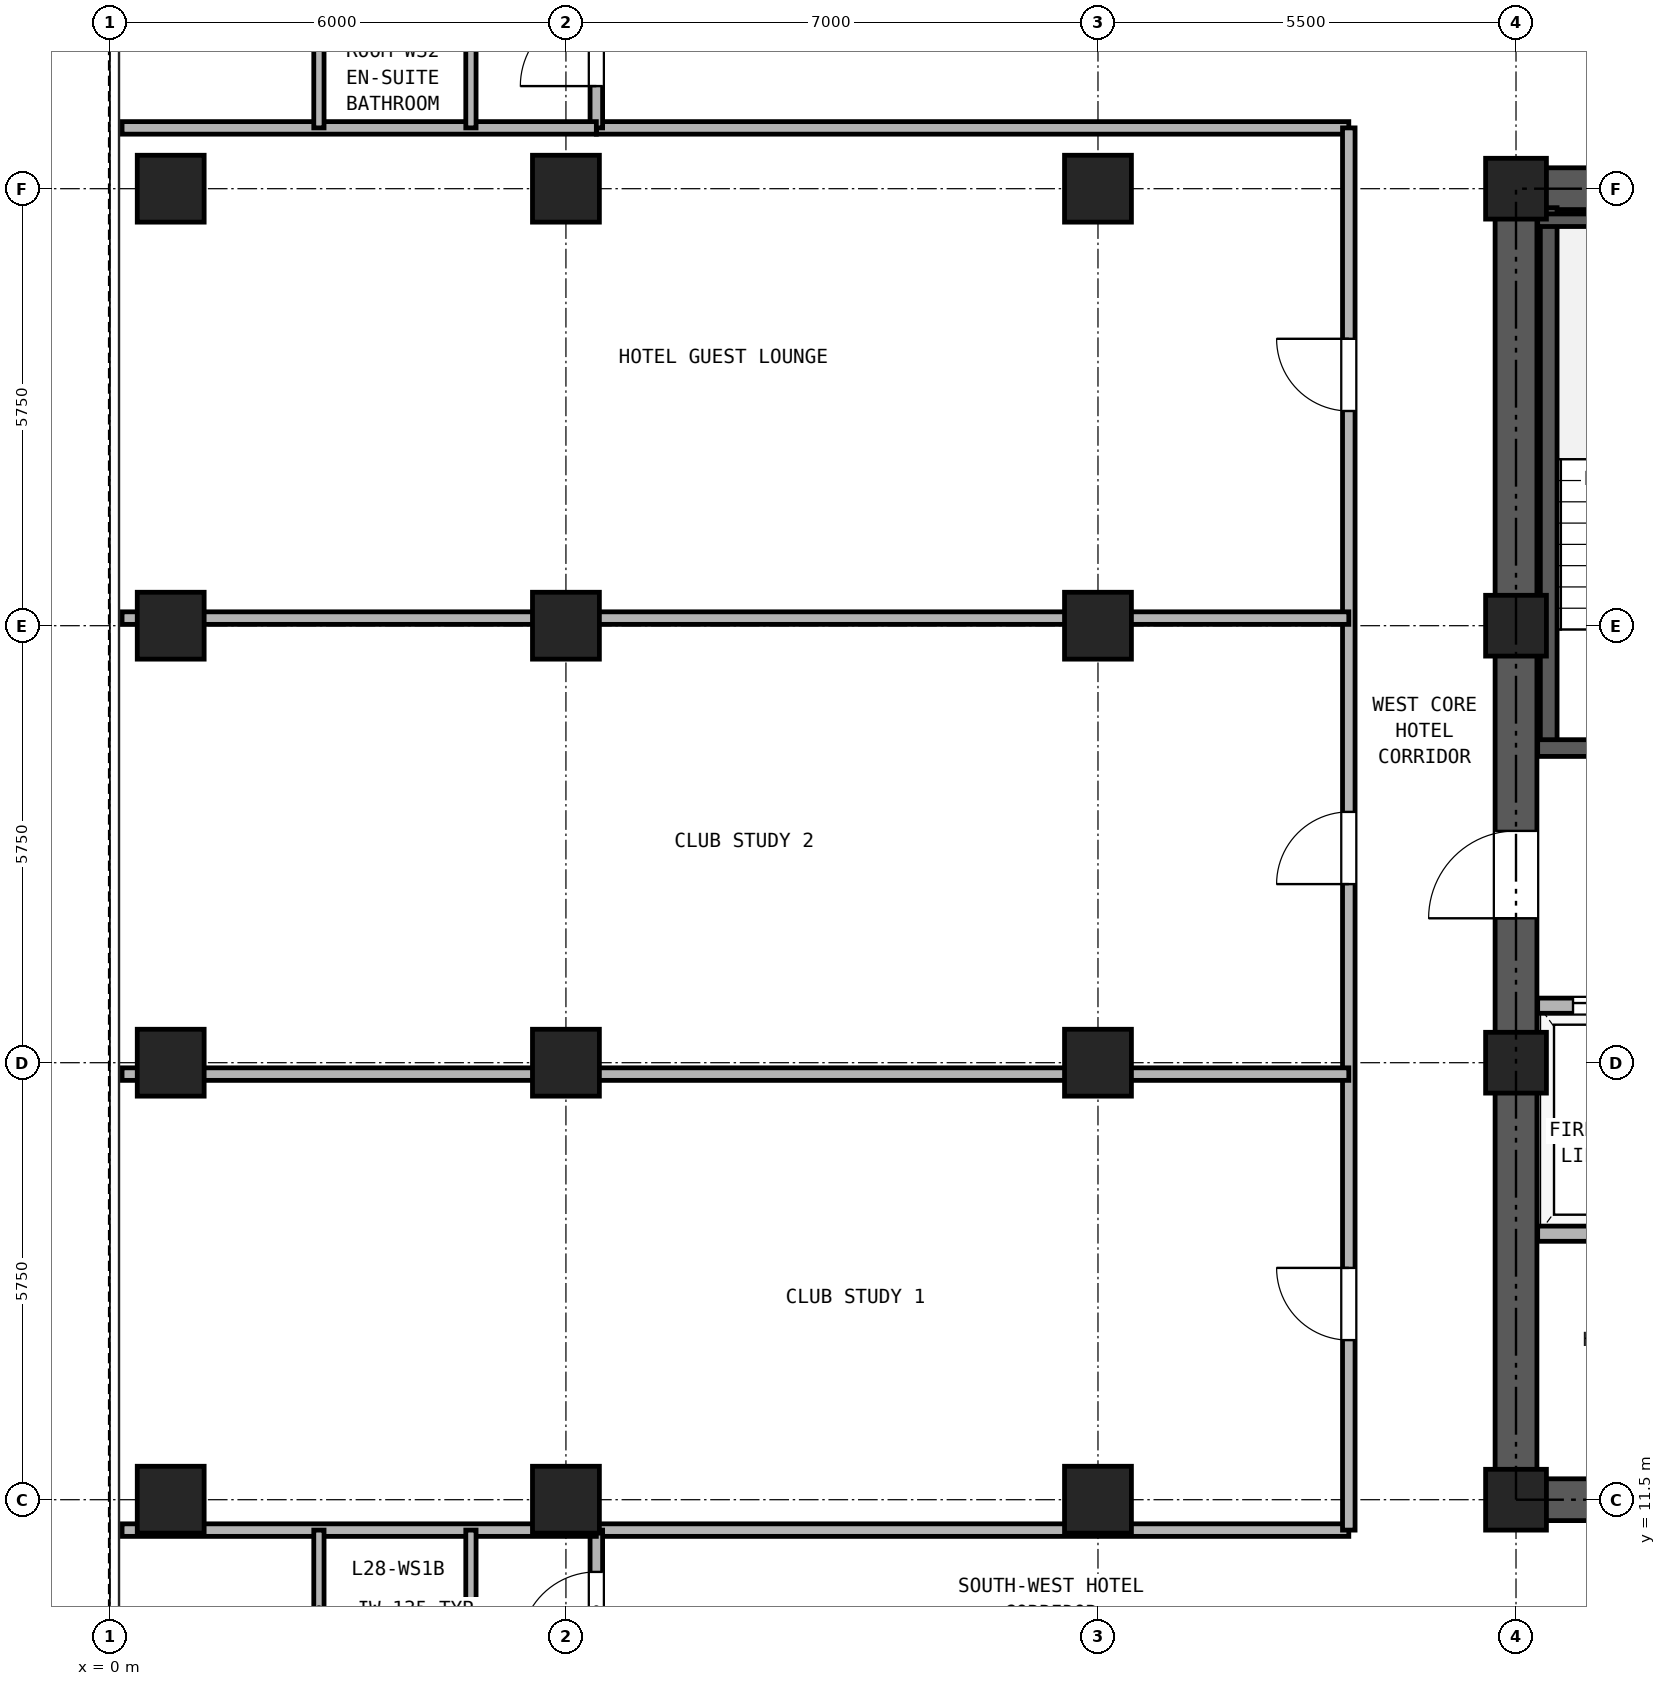
"""IFC4 building model, lengths in metres.
Left out: names, types, materials, properties, quantities, classifications, styles, units other than length and angle.
Written with IfcOpenShell. Run it as: python <this file> out.ifc"""

import sys

from ifc_helpers import new_model, si_unit, direction, frame, frame_2d, origin, origin_2d, place, context, subcontext, project, spatial, rectangle, hollow_rectangle, extrude, source, transform, mapped, element, fill, save


model = new_model("IFC4")
c1 = context("Model", 3, precision=1e-05, world=origin(), true_north=direction((0.0, 1.0)))
c2 = subcontext(c1, "Body", "Model", "MODEL_VIEW")
j1 = project(units=[si_unit("LENGTHUNIT", "METRE"), si_unit("PLANEANGLEUNIT", "RADIAN")], contexts=[c1])
p1 = place(None, origin())
s1 = spatial("IfcSite", under=j1, at=p1, CompositionType="ELEMENT")
p2 = place(p1, origin())
s2 = spatial("IfcBuilding", under=s1, at=p2, CompositionType="ELEMENT")
p3 = place(p2, frame((0.0, 0.0, 105.5)))
s3 = spatial("IfcBuildingStorey", under=s2, at=p3, CompositionType="ELEMENT", Elevation=105.5)
m1 = source(origin(), c2, "Body", "SweptSolid", [
    extrude(hollow_rectangle(XDim=0.88, YDim=0.88, WallThickness=0.05, at=origin_2d()), origin(), (0.0, 0.0, 1.0), 2.95),
])
for number, where, z_axis, x_axis in (
    (1, (0.8, 11.5, 0.0), (0.0, 0.0, 1.0), (1.0, 0.0, 0.0)),
    (2, (0.8, 17.25, 0.0), (0.0, 0.0, 1.0), (1.0, 0.0, 0.0)),
    (3, (0.8, 23.0, 0.0), (0.0, 0.0, 1.0), (1.0, 0.0, 0.0)),
    (4, (0.8, 28.75, 0.0), (0.0, 0.0, 1.0), (1.0, 0.0, 0.0)),
    (5, (6.0, 11.5, 0.0), (0.0, 0.0, 1.0), (1.0, 0.0, 0.0)),
    (6, (6.0, 17.25, 0.0), (0.0, 0.0, 1.0), (1.0, 0.0, 0.0)),
    (7, (6.0, 23.0, 0.0), (0.0, 0.0, 1.0), (1.0, 0.0, 0.0)),
    (8, (6.0, 28.75, 0.0), (0.0, 0.0, 1.0), (1.0, 0.0, 0.0)),
    (9, (13.0, 11.5, 0.0), (0.0, 0.0, 1.0), (1.0, 0.0, 0.0)),
    (10, (13.0, 17.25, 0.0), (0.0, 0.0, 1.0), (1.0, 0.0, 0.0)),
    (11, (13.0, 23.0, 0.0), (0.0, 0.0, 1.0), (1.0, 0.0, 0.0)),
    (12, (13.0, 28.75, 0.0), (0.0, 0.0, 1.0), (1.0, 0.0, 0.0)),
):
    element("IfcColumn", number, at=place(p3, frame(where, z_axis=z_axis, x_axis=x_axis)), inside=s3, PredefinedType="COLUMN", context=c2, shape_type="MappedRepresentation", body=[
        mapped(m1, transform((0.0, 0.0, 0.0), x_axis=(1.0, 0.0, 0.0), y_axis=(0.0, 1.0, 0.0), z_axis=(0.0, 0.0, 1.0), scale=1.0)),
    ])
m2 = source(origin(), c2, "Body", "SweptSolid", [
    extrude(hollow_rectangle(XDim=0.8, YDim=0.8, WallThickness=0.045, at=origin_2d()), origin(), (0.0, 0.0, 1.0), 2.95),
])
for number, where, z_axis, x_axis in (
    (13, (18.5, 11.5, 0.0), (0.0, 0.0, 1.0), (1.0, 0.0, 0.0)),
    (14, (18.5, 17.25, 0.0), (0.0, 0.0, 1.0), (1.0, 0.0, 0.0)),
    (15, (18.5, 23.0, 0.0), (0.0, 0.0, 1.0), (1.0, 0.0, 0.0)),
    (16, (18.5, 28.75, 0.0), (0.0, 0.0, 1.0), (1.0, 0.0, 0.0)),
):
    element("IfcColumn", number, at=place(p3, frame(where, z_axis=z_axis, x_axis=x_axis)), inside=s3, PredefinedType="COLUMN", context=c2, shape_type="MappedRepresentation", body=[
        mapped(m2, transform((0.0, 0.0, 0.0), x_axis=(1.0, 0.0, 0.0), y_axis=(0.0, 1.0, 0.0), z_axis=(0.0, 0.0, 1.0), scale=1.0)),
    ])
p4 = place(p3, frame((18.225, 11.5, 0.0), z_axis=(0.0, 0.0, 1.0), x_axis=(1.0, 0.0, 0.0)))
e17 = element("IfcWall", 17, at=p4, inside=s3, PredefinedType="SHEAR", context=c2, shape_type="SweptSolid", body=[
    extrude(rectangle(XDim=10.55, YDim=0.55, at=frame_2d((5.275, 0.0))), origin(), (0.0, 0.0, 1.0), 2.95),
])
p5 = place(p4, frame((2.375, 0.0, 0.0)))
e18 = element("IfcOpeningElement", 18, at=p5, cuts=e17, PredefinedType="OPENING", context=c2, shape_type="SweptSolid", body=[
    extrude(rectangle(XDim=0.95, YDim=2.15, at=frame_2d((0.475, 1.075))), frame((0.0, 0.285, 0.0), z_axis=(0.0, -1.0, 0.0), x_axis=(1.0, 0.0, 0.0)), (0.0, 0.0, 1.0), 0.57),
])
p6 = place(p4, frame((5.875, 0.0, 0.0)))
e19 = element("IfcOpeningElement", 19, at=p6, cuts=e17, PredefinedType="OPENING", context=c2, shape_type="SweptSolid", body=[
    extrude(rectangle(XDim=1.1, YDim=2.25, at=frame_2d((0.55, 1.125))), frame((0.0, 0.285, 0.0), z_axis=(0.0, -1.0, 0.0), x_axis=(1.0, 0.0, 0.0)), (0.0, 0.0, 1.0), 0.57),
])
p7 = place(p4, frame((8.275, 0.0, 0.0)))
e20 = element("IfcOpeningElement", 20, at=p7, cuts=e17, PredefinedType="OPENING", context=c2, shape_type="SweptSolid", body=[
    extrude(rectangle(XDim=1.1, YDim=2.25, at=frame_2d((0.55, 1.125))), frame((0.0, 0.285, 0.0), z_axis=(0.0, -1.0, 0.0), x_axis=(1.0, 0.0, 0.0)), (0.0, 0.0, 1.0), 0.57),
])
p8 = place(p3, frame((18.225, 28.75, 0.0), z_axis=(0.0, 0.0, 1.0), x_axis=(1.0, 0.0, 0.0)))
e21 = element("IfcWall", 21, at=p8, inside=s3, PredefinedType="SHEAR", context=c2, shape_type="SweptSolid", body=[
    extrude(rectangle(XDim=10.55, YDim=0.55, at=frame_2d((5.275, 0.0))), origin(), (0.0, 0.0, 1.0), 2.95),
])
p9 = place(p8, frame((4.155, 0.0, 0.0)))
e22 = element("IfcOpeningElement", 22, at=p9, cuts=e21, PredefinedType="OPENING", context=c2, shape_type="SweptSolid", body=[
    extrude(rectangle(XDim=0.9, YDim=2.05, at=frame_2d((0.45, 1.025))), frame((0.0, 0.285, 0.0), z_axis=(0.0, -1.0, 0.0), x_axis=(1.0, 0.0, 0.0)), (0.0, 0.0, 1.0), 0.57),
])
p10 = place(p8, frame((5.695, 0.0, 0.0)))
e23 = element("IfcOpeningElement", 23, at=p10, cuts=e21, PredefinedType="OPENING", context=c2, shape_type="SweptSolid", body=[
    extrude(rectangle(XDim=0.9, YDim=2.05, at=frame_2d((0.45, 1.025))), frame((0.0, 0.285, 0.0), z_axis=(0.0, -1.0, 0.0), x_axis=(1.0, 0.0, 0.0)), (0.0, 0.0, 1.0), 0.57),
])
p11 = place(p3, frame((18.5, 11.775, 0.0), z_axis=(0.0, 0.0, 1.0), x_axis=(0.0, 1.0, 0.0)))
e24 = element("IfcWall", 24, at=p11, inside=s3, PredefinedType="SHEAR", context=c2, shape_type="SweptSolid", body=[
    extrude(rectangle(XDim=16.7, YDim=0.55, at=frame_2d((8.35, 0.0))), origin(), (0.0, 0.0, 1.0), 2.95),
])
p12 = place(p11, frame((7.375, 0.0, 0.0)))
e25 = element("IfcOpeningElement", 25, at=p12, cuts=e24, PredefinedType="OPENING", context=c2, shape_type="SweptSolid", body=[
    extrude(rectangle(XDim=1.15, YDim=2.2, at=frame_2d((0.575, 1.1))), frame((0.0, 0.285, 0.0), z_axis=(0.0, -1.0, 0.0), x_axis=(1.0, 0.0, 0.0)), (0.0, 0.0, 1.0), 0.57),
])
p13 = place(p3, frame((18.93, 21.39, 0.0), z_axis=(0.0, 0.0, 1.0), x_axis=(0.0, 1.0, 0.0)))
e26 = element("IfcWall", 26, at=p13, inside=s3, PredefinedType="SOLIDWALL", context=c2, shape_type="SweptSolid", body=[
    extrude(rectangle(XDim=7.11, YDim=0.22, at=frame_2d((3.555, 0.0))), origin(), (0.0, 0.0, 1.0), 2.95),
])
p14 = place(p3, frame((18.785, 28.335, 0.0), z_axis=(0.0, 0.0, 1.0), x_axis=(1.0, 0.0, 0.0)))
e27 = element("IfcWall", 27, at=p14, inside=s3, PredefinedType="PARTITIONING", context=c2, shape_type="SweptSolid", body=[
    extrude(rectangle(XDim=3.325, YDim=0.165, at=frame_2d((1.663, 0.0))), origin(), (0.0, 0.0, 1.0), 2.95),
])
p15 = place(p3, frame((18.785, 21.39, 0.0), z_axis=(0.0, 0.0, 1.0), x_axis=(1.0, 0.0, 0.0)))
e28 = element("IfcWall", 28, at=p15, inside=s3, PredefinedType="SOLIDWALL", context=c2, shape_type="SweptSolid", body=[
    extrude(rectangle(XDim=6.345, YDim=0.22, at=frame_2d((3.172, 0.0))), origin(), (0.0, 0.0, 1.0), 2.95),
])
p16 = place(p15, frame((1.065, 0.0, 0.0)))
e29 = element("IfcOpeningElement", 29, at=p16, cuts=e28, PredefinedType="OPENING", context=c2, shape_type="SweptSolid", body=[
    extrude(rectangle(XDim=1.15, YDim=2.2, at=frame_2d((0.575, 1.1))), frame((0.0, 0.12, 0.0), z_axis=(0.0, -1.0, 0.0), x_axis=(1.0, 0.0, 0.0)), (0.0, 0.0, 1.0), 0.24),
])
p17 = place(p15, frame((4.795, 0.0, 0.0)))
e30 = element("IfcOpeningElement", 30, at=p17, cuts=e28, PredefinedType="OPENING", context=c2, shape_type="SweptSolid", body=[
    extrude(rectangle(XDim=1.1, YDim=2.25, at=frame_2d((0.55, 1.125))), frame((0.0, 0.12, 0.0), z_axis=(0.0, -1.0, 0.0), x_axis=(1.0, 0.0, 0.0)), (0.0, 0.0, 1.0), 0.24),
])
p18 = place(p3, frame((18.785, 18.0, 0.0), z_axis=(0.0, 0.0, 1.0), x_axis=(1.0, 0.0, 0.0)))
e31 = element("IfcWall", 31, at=p18, inside=s3, PredefinedType="PARTITIONING", context=c2, shape_type="SweptSolid", body=[
    extrude(rectangle(XDim=9.43, YDim=0.2, at=frame_2d((4.715, 0.0))), origin(), (0.0, 0.0, 1.0), 2.95),
])
p19 = place(p18, frame((0.465, 0.0, 0.0)))
e32 = element("IfcOpeningElement", 32, at=p19, cuts=e31, PredefinedType="OPENING", context=c2, shape_type="SweptSolid", body=[
    extrude(rectangle(XDim=1.3, YDim=2.3, at=frame_2d((0.65, 1.15))), frame((0.0, 0.11, 0.0), z_axis=(0.0, -1.0, 0.0), x_axis=(1.0, 0.0, 0.0)), (0.0, 0.0, 1.0), 0.22),
])
p20 = place(p18, frame((2.565, 0.0, 0.0)))
e33 = element("IfcOpeningElement", 33, at=p20, cuts=e31, PredefinedType="OPENING", context=c2, shape_type="SweptSolid", body=[
    extrude(rectangle(XDim=1.3, YDim=2.3, at=frame_2d((0.65, 1.15))), frame((0.0, 0.11, 0.0), z_axis=(0.0, -1.0, 0.0), x_axis=(1.0, 0.0, 0.0)), (0.0, 0.0, 1.0), 0.22),
])
p21 = place(p18, frame((4.985, 0.0, 0.0)))
e34 = element("IfcOpeningElement", 34, at=p21, cuts=e31, PredefinedType="OPENING", context=c2, shape_type="SweptSolid", body=[
    extrude(rectangle(XDim=0.9, YDim=2.05, at=frame_2d((0.45, 1.025))), frame((0.0, 0.11, 0.0), z_axis=(0.0, -1.0, 0.0), x_axis=(1.0, 0.0, 0.0)), (0.0, 0.0, 1.0), 0.22),
])
p22 = place(p18, frame((8.115, 0.0, 0.0)))
e35 = element("IfcOpeningElement", 35, at=p22, cuts=e31, PredefinedType="OPENING", context=c2, shape_type="SweptSolid", body=[
    extrude(rectangle(XDim=0.9, YDim=2.05, at=frame_2d((0.45, 1.025))), frame((0.0, 0.11, 0.0), z_axis=(0.0, -1.0, 0.0), x_axis=(1.0, 0.0, 0.0)), (0.0, 0.0, 1.0), 0.22),
])
p23 = place(p3, frame((18.785, 15.0, 0.0), z_axis=(0.0, 0.0, 1.0), x_axis=(1.0, 0.0, 0.0)))
e36 = element("IfcWall", 36, at=p23, inside=s3, PredefinedType="PARTITIONING", context=c2, shape_type="SweptSolid", body=[
    extrude(rectangle(XDim=9.43, YDim=0.2, at=frame_2d((4.715, 0.0))), origin(), (0.0, 0.0, 1.0), 2.95),
])
for number, where, z_axis, x_axis in (
    (37, (6.4, 11.1, 0.0), (0.0, 0.0, 1.0), (1.0, 0.0, 0.0)),
    (38, (6.4, 29.55, 0.0), (0.0, 0.0, 1.0), (1.0, 0.0, 0.0)),
):
    element("IfcWall", number, at=place(p3, frame(where, z_axis=z_axis, x_axis=x_axis)), inside=s3, PredefinedType="PARTITIONING", context=c2, shape_type="SweptSolid", body=[
        extrude(rectangle(XDim=9.9, YDim=0.165, at=frame_2d((4.95, 0.0))), origin(), (0.0, 0.0, 1.0), 2.95),
    ])
p24 = place(p3, frame((16.3, 11.1, 0.0), z_axis=(0.0, 0.0, 1.0), x_axis=(0.0, 1.0, 0.0)))
e39 = element("IfcWall", 39, at=p24, inside=s3, PredefinedType="PARTITIONING", context=c2, shape_type="SweptSolid", body=[
    extrude(rectangle(XDim=18.45, YDim=0.165, at=frame_2d((9.225, 0.0))), origin(), (0.0, 0.0, 1.0), 2.95),
])
p25 = place(p24, frame((2.5, 0.0, 0.0)))
e40 = element("IfcOpeningElement", 40, at=p25, cuts=e39, PredefinedType="OPENING", context=c2, shape_type="SweptSolid", body=[
    extrude(rectangle(XDim=0.95, YDim=2.15, at=frame_2d((0.475, 1.075))), frame((0.0, 0.093, 0.0), z_axis=(0.0, -1.0, 0.0), x_axis=(1.0, 0.0, 0.0)), (0.0, 0.0, 1.0), 0.185),
])
p26 = place(p24, frame((8.5, 0.0, 0.0)))
e41 = element("IfcOpeningElement", 41, at=p26, cuts=e39, PredefinedType="OPENING", context=c2, shape_type="SweptSolid", body=[
    extrude(rectangle(XDim=0.95, YDim=2.15, at=frame_2d((0.475, 1.075))), frame((0.0, 0.093, 0.0), z_axis=(0.0, -1.0, 0.0), x_axis=(1.0, 0.0, 0.0)), (0.0, 0.0, 1.0), 0.185),
])
p27 = place(p24, frame((14.725, 0.0, 0.0)))
e42 = element("IfcOpeningElement", 42, at=p27, cuts=e39, PredefinedType="OPENING", context=c2, shape_type="SweptSolid", body=[
    extrude(rectangle(XDim=0.95, YDim=2.15, at=frame_2d((0.475, 1.075))), frame((0.0, 0.093, 0.0), z_axis=(0.0, -1.0, 0.0), x_axis=(1.0, 0.0, 0.0)), (0.0, 0.0, 1.0), 0.185),
])
p28 = place(p3, frame((6.4, 0.16, 0.0), z_axis=(0.0, 0.0, 1.0), x_axis=(0.0, 1.0, 0.0)))
e43 = element("IfcWall", 43, at=p28, inside=s3, PredefinedType="PARTITIONING", context=c2, shape_type="SweptSolid", body=[
    extrude(rectangle(XDim=10.94, YDim=0.165, at=frame_2d((5.47, 0.0))), origin(), (0.0, 0.0, 1.0), 2.95),
])
p29 = place(p28, frame((9.39, 0.0, 0.0)))
e44 = element("IfcOpeningElement", 44, at=p29, cuts=e43, PredefinedType="OPENING", context=c2, shape_type="SweptSolid", body=[
    extrude(rectangle(XDim=1.0, YDim=2.15, at=frame_2d((0.5, 1.075))), frame((0.0, 0.093, 0.0), z_axis=(0.0, -1.0, 0.0), x_axis=(1.0, 0.0, 0.0)), (0.0, 0.0, 1.0), 0.185),
])
p30 = place(p3, frame((6.4, 29.55, 0.0), z_axis=(0.0, 0.0, 1.0), x_axis=(0.0, 1.0, 0.0)))
e45 = element("IfcWall", 45, at=p30, inside=s3, PredefinedType="PARTITIONING", context=c2, shape_type="SweptSolid", body=[
    extrude(rectangle(XDim=5.59, YDim=0.165, at=frame_2d((2.795, 0.0))), origin(), (0.0, 0.0, 1.0), 2.95),
])
p31 = place(p30, frame((0.55, 0.0, 0.0)))
e46 = element("IfcOpeningElement", 46, at=p31, cuts=e45, PredefinedType="OPENING", context=c2, shape_type="SweptSolid", body=[
    extrude(rectangle(XDim=1.0, YDim=2.15, at=frame_2d((0.5, 1.075))), frame((0.0, 0.093, 0.0), z_axis=(0.0, -1.0, 0.0), x_axis=(1.0, 0.0, 0.0)), (0.0, 0.0, 1.0), 0.185),
])
for number, where, z_axis, x_axis in (
    (47, (0.16, 11.1, 0.0), (0.0, 0.0, 1.0), (1.0, 0.0, 0.0)),
    (48, (0.16, 29.55, 0.0), (0.0, 0.0, 1.0), (1.0, 0.0, 0.0)),
):
    element("IfcWall", number, at=place(p3, frame(where, z_axis=z_axis, x_axis=x_axis)), inside=s3, PredefinedType="PARTITIONING", context=c2, shape_type="SweptSolid", body=[
        extrude(rectangle(XDim=6.24, YDim=0.165, at=frame_2d((3.12, 0.0))), origin(), (0.0, 0.0, 1.0), 2.95),
    ])
for number, where, z_axis, x_axis in (
    (49, (2.75, 9.0, 0.0), (0.0, 0.0, 1.0), (0.0, 1.0, 0.0)),
    (50, (4.75, 9.0, 0.0), (0.0, 0.0, 1.0), (0.0, 1.0, 0.0)),
):
    element("IfcWall", number, at=place(p3, frame(where, z_axis=z_axis, x_axis=x_axis)), inside=s3, PredefinedType="PARTITIONING", context=c2, shape_type="SweptSolid", body=[
        extrude(rectangle(XDim=2.1, YDim=0.135, at=frame_2d((1.05, 0.0))), origin(), (0.0, 0.0, 1.0), 2.95),
    ])
for number, where, z_axis, x_axis in (
    (51, (2.75, 29.55, 0.0), (0.0, 0.0, 1.0), (0.0, 1.0, 0.0)),
    (52, (4.75, 29.55, 0.0), (0.0, 0.0, 1.0), (0.0, 1.0, 0.0)),
):
    element("IfcWall", number, at=place(p3, frame(where, z_axis=z_axis, x_axis=x_axis)), inside=s3, PredefinedType="PARTITIONING", context=c2, shape_type="SweptSolid", body=[
        extrude(rectangle(XDim=2.1, YDim=0.135, at=frame_2d((1.05, 0.0))), origin(), (0.0, 0.0, 1.0), 2.95),
    ])
for number, where, z_axis, x_axis in (
    (53, (0.16, 17.1, 0.0), (0.0, 0.0, 1.0), (1.0, 0.0, 0.0)),
    (54, (0.16, 23.1, 0.0), (0.0, 0.0, 1.0), (1.0, 0.0, 0.0)),
):
    element("IfcWall", number, at=place(p3, frame(where, z_axis=z_axis, x_axis=x_axis)), inside=s3, PredefinedType="PARTITIONING", context=c2, shape_type="SweptSolid", body=[
        extrude(rectangle(XDim=16.14, YDim=0.165, at=frame_2d((8.07, 0.0))), origin(), (0.0, 0.0, 1.0), 2.247),
    ])
p32 = place(p19, origin())
e55 = element("IfcDoor", 55, at=p32, inside=s3, OperationType="DOUBLE_DOOR_SLIDING", PredefinedType="DOOR", context=c2, shape_type="SweptSolid", body=[
    extrude(rectangle(XDim=1.3, YDim=2.3, at=frame_2d((0.65, 1.15))), frame((0.0, 0.025, 0.0), z_axis=(0.0, -1.0, 0.0), x_axis=(1.0, 0.0, 0.0)), (0.0, 0.0, 1.0), 0.05),
])
fill(e32, e55)
p33 = place(p12, frame((1.15, 0.0, 0.0), z_axis=(0.0, 0.0, 1.0), x_axis=(-1.0, 0.0, 0.0)))
e56 = element("IfcDoor", 56, at=p33, inside=s3, OperationType="SINGLE_SWING_LEFT", PredefinedType="DOOR", context=c2, shape_type="SweptSolid", body=[
    extrude(rectangle(XDim=1.15, YDim=2.2, at=frame_2d((0.575, 1.1))), frame((0.0, 0.025, 0.0), z_axis=(0.0, -1.0, 0.0), x_axis=(1.0, 0.0, 0.0)), (0.0, 0.0, 1.0), 0.05),
])
fill(e25, e56)
p34 = place(p29, origin())
e57 = element("IfcDoor", 57, at=p34, inside=s3, OperationType="SINGLE_SWING_LEFT", PredefinedType="DOOR", context=c2, shape_type="SweptSolid", body=[
    extrude(rectangle(XDim=1.0, YDim=2.15, at=frame_2d((0.5, 1.075))), frame((0.0, 0.025, 0.0), z_axis=(0.0, -1.0, 0.0), x_axis=(1.0, 0.0, 0.0)), (0.0, 0.0, 1.0), 0.05),
])
fill(e44, e57)
p35 = place(p31, origin())
e58 = element("IfcDoor", 58, at=p35, inside=s3, OperationType="SINGLE_SWING_LEFT", PredefinedType="DOOR", context=c2, shape_type="SweptSolid", body=[
    extrude(rectangle(XDim=1.0, YDim=2.15, at=frame_2d((0.5, 1.075))), frame((0.0, 0.025, 0.0), z_axis=(0.0, -1.0, 0.0), x_axis=(1.0, 0.0, 0.0)), (0.0, 0.0, 1.0), 0.05),
])
fill(e46, e58)
p36 = place(p25, frame((0.95, 0.0, 0.0), z_axis=(0.0, 0.0, 1.0), x_axis=(-1.0, 0.0, 0.0)))
e59 = element("IfcDoor", 59, at=p36, inside=s3, OperationType="SINGLE_SWING_RIGHT", PredefinedType="DOOR", context=c2, shape_type="SweptSolid", body=[
    extrude(rectangle(XDim=0.95, YDim=2.15, at=frame_2d((0.475, 1.075))), frame((0.0, 0.025, 0.0), z_axis=(0.0, -1.0, 0.0), x_axis=(1.0, 0.0, 0.0)), (0.0, 0.0, 1.0), 0.05),
])
fill(e40, e59)
p37 = place(p26, frame((0.95, 0.0, 0.0), z_axis=(0.0, 0.0, 1.0), x_axis=(-1.0, 0.0, 0.0)))
e60 = element("IfcDoor", 60, at=p37, inside=s3, OperationType="SINGLE_SWING_LEFT", PredefinedType="DOOR", context=c2, shape_type="SweptSolid", body=[
    extrude(rectangle(XDim=0.95, YDim=2.15, at=frame_2d((0.475, 1.075))), frame((0.0, 0.025, 0.0), z_axis=(0.0, -1.0, 0.0), x_axis=(1.0, 0.0, 0.0)), (0.0, 0.0, 1.0), 0.05),
])
fill(e41, e60)
p38 = place(p27, frame((0.95, 0.0, 0.0), z_axis=(0.0, 0.0, 1.0), x_axis=(-1.0, 0.0, 0.0)))
e61 = element("IfcDoor", 61, at=p38, inside=s3, OperationType="SINGLE_SWING_RIGHT", PredefinedType="DOOR", context=c2, shape_type="SweptSolid", body=[
    extrude(rectangle(XDim=0.95, YDim=2.15, at=frame_2d((0.475, 1.075))), frame((0.0, 0.025, 0.0), z_axis=(0.0, -1.0, 0.0), x_axis=(1.0, 0.0, 0.0)), (0.0, 0.0, 1.0), 0.05),
])
fill(e42, e61)
save(model, sys.argv[1])
